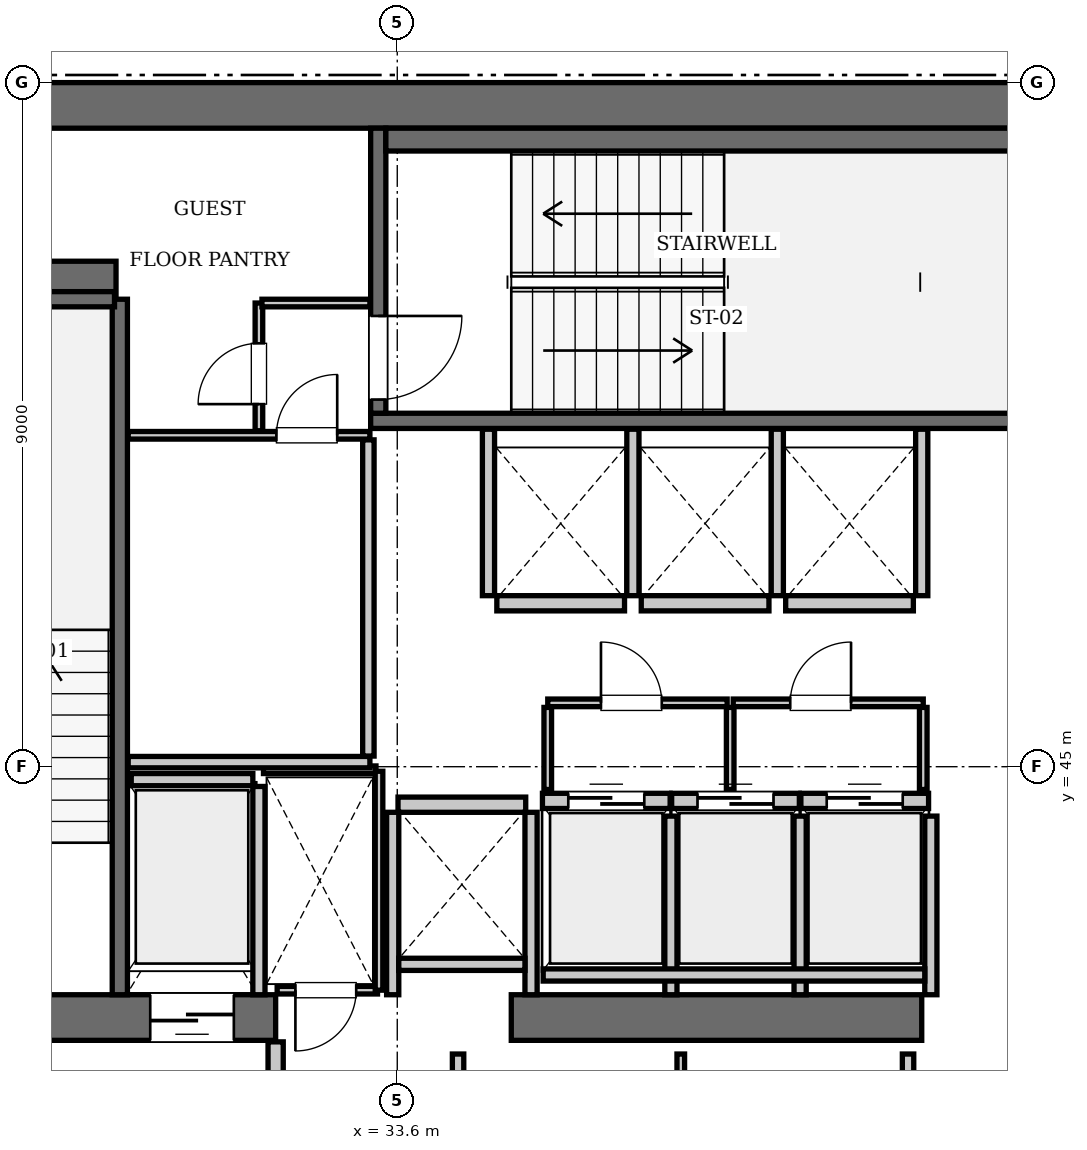
"""IFC4 building model, lengths in metres.
Left out: names, types, materials, properties, quantities, classifications, styles, units other than length and angle.
Written with IfcOpenShell. Run it as: python <this file> out.ifc"""

import sys

from ifc_helpers import new_model, si_unit, direction, frame, frame_2d, origin, place, context, subcontext, project, spatial, rectangle, extrude, element, fill, save


model = new_model("IFC4")
c1 = context("Model", 3, precision=1e-05, world=origin(), true_north=direction((0.0, 1.0)))
c2 = subcontext(c1, "Body", "Model", "MODEL_VIEW")
j1 = project(units=[si_unit("LENGTHUNIT", "METRE"), si_unit("PLANEANGLEUNIT", "RADIAN")], contexts=[c1])
p1 = place(None, origin())
s1 = spatial("IfcSite", under=j1, at=p1, CompositionType="ELEMENT")
p2 = place(p1, origin())
s2 = spatial("IfcBuilding", under=s1, at=p2, CompositionType="ELEMENT")
p3 = place(p2, frame((0.0, 0.0, 254.8)))
s3 = spatial("IfcBuildingStorey", under=s2, at=p3, CompositionType="ELEMENT", Elevation=254.8)
p4 = place(p3, frame((25.2, 53.7, 0.0), z_axis=(0.0, 0.0, 1.0), x_axis=(1.0, 0.0, 0.0)))
e1 = element("IfcWall", 1, at=p4, inside=s3, PredefinedType="SHEAR", context=c2, shape_type="SweptSolid", body=[
    extrude(rectangle(XDim=25.2, YDim=0.6, at=frame_2d((12.6, 0.0))), origin(), (0.0, 0.0, 1.0), 3.85),
])
p5 = place(p3, frame((25.2, 41.7, 0.0), z_axis=(0.0, 0.0, 1.0), x_axis=(1.0, 0.0, 0.0)))
e2 = element("IfcWall", 2, at=p5, inside=s3, PredefinedType="SHEAR", context=c2, shape_type="SweptSolid", body=[
    extrude(rectangle(XDim=6.8, YDim=0.6, at=frame_2d((3.4, 0.0))), origin(), (0.0, 0.0, 1.0), 3.85),
])
p6 = place(p5, frame((1.65, 0.0, 0.0)))
e3 = element("IfcOpeningElement", 3, at=p6, cuts=e2, PredefinedType="OPENING", context=c2, shape_type="SweptSolid", body=[
    extrude(rectangle(XDim=1.15, YDim=2.15, at=frame_2d((0.575, 1.075))), frame((0.0, 0.31, 0.0), z_axis=(0.0, -1.0, 0.0), x_axis=(1.0, 0.0, 0.0)), (0.0, 0.0, 1.0), 0.62),
])
p7 = place(p5, frame((5.15, 0.0, 0.0)))
e4 = element("IfcOpeningElement", 4, at=p7, cuts=e2, PredefinedType="OPENING", context=c2, shape_type="SweptSolid", body=[
    extrude(rectangle(XDim=1.1, YDim=2.2, at=frame_2d((0.55, 1.1))), frame((0.0, 0.31, 0.0), z_axis=(0.0, -1.0, 0.0), x_axis=(1.0, 0.0, 0.0)), (0.0, 0.0, 1.0), 0.62),
])
p8 = place(p3, frame((35.1, 41.7, 0.0), z_axis=(0.0, 0.0, 1.0), x_axis=(1.0, 0.0, 0.0)))
e5 = element("IfcWall", 5, at=p8, inside=s3, PredefinedType="SHEAR", context=c2, shape_type="SweptSolid", body=[
    extrude(rectangle(XDim=5.4, YDim=0.6, at=frame_2d((2.7, 0.0))), origin(), (0.0, 0.0, 1.0), 3.85),
])
p9 = place(p3, frame((25.8, 51.4, 0.0), z_axis=(0.0, 0.0, 1.0), x_axis=(1.0, 0.0, 0.0)))
e6 = element("IfcWall", 6, at=p9, inside=s3, PredefinedType="SHEAR", context=c2, shape_type="SweptSolid", body=[
    extrude(rectangle(XDim=4.1, YDim=0.5, at=frame_2d((2.05, 0.0))), origin(), (0.0, 0.0, 1.0), 3.85),
])
p10 = place(p3, frame((29.95, 42.0, 0.0), z_axis=(0.0, 0.0, 1.0), x_axis=(0.0, 1.0, 0.0)))
e7 = element("IfcWall", 7, at=p10, inside=s3, PredefinedType="SOLIDWALL", context=c2, shape_type="SweptSolid", body=[
    extrude(rectangle(XDim=9.15, YDim=0.2, at=frame_2d((4.575, 0.0))), origin(), (0.0, 0.0, 1.0), 3.61),
])
p11 = place(p3, frame((26.38, 51.15, 0.0), z_axis=(0.0, 0.0, 1.0), x_axis=(1.0, 0.0, 0.0)))
e8 = element("IfcWall", 8, at=p11, inside=s3, PredefinedType="SOLIDWALL", context=c2, shape_type="SweptSolid", body=[
    extrude(rectangle(XDim=3.5, YDim=0.2, at=frame_2d((1.75, 0.0))), origin(), (0.0, 0.0, 1.0), 3.61),
])
p12 = place(p3, frame((33.25, 49.55, 0.0), z_axis=(0.0, 0.0, 1.0), x_axis=(1.0, 0.0, 0.0)))
e9 = element("IfcWall", 9, at=p12, inside=s3, PredefinedType="SOLIDWALL", context=c2, shape_type="SweptSolid", body=[
    extrude(rectangle(XDim=9.1, YDim=0.2, at=frame_2d((4.55, 0.0))), origin(), (0.0, 0.0, 1.0), 3.61),
])
p13 = place(p3, frame((33.35, 49.65, 0.0), z_axis=(0.0, 0.0, 1.0), x_axis=(0.0, 1.0, 0.0)))
e10 = element("IfcWall", 10, at=p13, inside=s3, PredefinedType="SOLIDWALL", context=c2, shape_type="SweptSolid", body=[
    extrude(rectangle(XDim=3.75, YDim=0.2, at=frame_2d((1.875, 0.0))), origin(), (0.0, 0.0, 1.0), 3.61),
])
p14 = place(p13, frame((0.18, 0.0, 0.0)))
e11 = element("IfcOpeningElement", 11, at=p14, cuts=e10, PredefinedType="OPENING", context=c2, shape_type="SweptSolid", body=[
    extrude(rectangle(XDim=1.1, YDim=2.15, at=frame_2d((0.55, 1.075))), frame((0.0, 0.11, 0.0), z_axis=(0.0, -1.0, 0.0), x_axis=(1.0, 0.0, 0.0)), (0.0, 0.0, 1.0), 0.22),
])
p15 = place(p3, frame((33.45, 53.25, 0.0), z_axis=(0.0, 0.0, 1.0), x_axis=(1.0, 0.0, 0.0)))
e12 = element("IfcWall", 12, at=p15, inside=s3, PredefinedType="SOLIDWALL", context=c2, shape_type="SweptSolid", body=[
    extrude(rectangle(XDim=8.7, YDim=0.3, at=frame_2d((4.35, 0.0))), origin(), (0.0, 0.0, 1.0), 3.61),
])
p16 = place(p3, frame((35.51, 44.55, 0.0), z_axis=(0.0, 0.0, 1.0), x_axis=(1.0, 0.0, 0.0)))
e13 = element("IfcWall", 13, at=p16, inside=s3, PredefinedType="SOLIDWALL", context=c2, shape_type="SweptSolid", body=[
    extrude(rectangle(XDim=1.68, YDim=0.2, at=frame_2d((0.84, 0.0))), origin(), (0.0, 0.0, 1.0), 3.61),
])
p17 = place(p16, frame((0.34, 0.0, 0.0)))
e14 = element("IfcOpeningElement", 14, at=p17, cuts=e13, PredefinedType="OPENING", context=c2, shape_type="SweptSolid", body=[
    extrude(rectangle(XDim=1.0, YDim=2.15, at=frame_2d((0.5, 1.075))), frame((0.0, 0.11, 0.0), z_axis=(0.0, -1.0, 0.0), x_axis=(1.0, 0.0, 0.0)), (0.0, 0.0, 1.0), 0.22),
])
p18 = place(p3, frame((37.21, 44.55, 0.0), z_axis=(0.0, 0.0, 1.0), x_axis=(1.0, 0.0, 0.0)))
e15 = element("IfcWall", 15, at=p18, inside=s3, PredefinedType="SOLIDWALL", context=c2, shape_type="SweptSolid", body=[
    extrude(rectangle(XDim=1.68, YDim=0.2, at=frame_2d((0.84, 0.0))), origin(), (0.0, 0.0, 1.0), 3.61),
])
p19 = place(p18, frame((0.34, 0.0, 0.0)))
e16 = element("IfcOpeningElement", 16, at=p19, cuts=e15, PredefinedType="OPENING", context=c2, shape_type="SweptSolid", body=[
    extrude(rectangle(XDim=1.0, YDim=2.15, at=frame_2d((0.5, 1.075))), frame((0.0, 0.11, 0.0), z_axis=(0.0, -1.0, 0.0), x_axis=(1.0, 0.0, 0.0)), (0.0, 0.0, 1.0), 0.22),
])
p20 = place(p3, frame((38.91, 44.55, 0.0), z_axis=(0.0, 0.0, 1.0), x_axis=(1.0, 0.0, 0.0)))
e17 = element("IfcWall", 17, at=p20, inside=s3, PredefinedType="SOLIDWALL", context=c2, shape_type="SweptSolid", body=[
    extrude(rectangle(XDim=1.68, YDim=0.2, at=frame_2d((0.84, 0.0))), origin(), (0.0, 0.0, 1.0), 3.61),
])
p21 = place(p20, frame((0.34, 0.0, 0.0)))
e18 = element("IfcOpeningElement", 18, at=p21, cuts=e17, PredefinedType="OPENING", context=c2, shape_type="SweptSolid", body=[
    extrude(rectangle(XDim=1.0, YDim=2.15, at=frame_2d((0.5, 1.075))), frame((0.0, 0.11, 0.0), z_axis=(0.0, -1.0, 0.0), x_axis=(1.0, 0.0, 0.0)), (0.0, 0.0, 1.0), 0.22),
])
p22 = place(p3, frame((34.91, 47.15, 0.0), z_axis=(0.0, 0.0, 1.0), x_axis=(1.0, 0.0, 0.0)))
e19 = element("IfcWall", 19, at=p22, inside=s3, PredefinedType="SOLIDWALL", context=c2, shape_type="SweptSolid", body=[
    extrude(rectangle(XDim=1.68, YDim=0.2, at=frame_2d((0.84, 0.0))), origin(), (0.0, 0.0, 1.0), 3.61),
])
for number, where, z_axis, x_axis in (
    (20, (36.81, 47.15, 0.0), (0.0, 0.0, 1.0), (1.0, 0.0, 0.0)),
    (21, (38.71, 47.15, 0.0), (0.0, 0.0, 1.0), (1.0, 0.0, 0.0)),
    (22, (33.61, 44.5, 0.0), (0.0, 0.0, 1.0), (1.0, 0.0, 0.0)),
):
    element("IfcWall", number, at=place(p3, frame(where, z_axis=z_axis, x_axis=x_axis)), inside=s3, PredefinedType="SOLIDWALL", context=c2, shape_type="SweptSolid", body=[
        extrude(rectangle(XDim=1.68, YDim=0.2, at=frame_2d((0.84, 0.0))), origin(), (0.0, 0.0, 1.0), 3.61),
    ])
p23 = place(p3, frame((30.1, 44.83, 0.0), z_axis=(0.0, 0.0, 1.0), x_axis=(1.0, 0.0, 0.0)))
e23 = element("IfcWall", 23, at=p23, inside=s3, PredefinedType="SOLIDWALL", context=c2, shape_type="SweptSolid", body=[
    extrude(rectangle(XDim=1.6, YDim=0.16, at=frame_2d((0.8, 0.0))), origin(), (0.0, 0.0, 1.0), 3.61),
])
p24 = place(p3, frame((31.78, 42.0, 0.0), z_axis=(0.0, 0.0, 1.0), x_axis=(0.0, 1.0, 0.0)))
e24 = element("IfcWall", 24, at=p24, inside=s3, PredefinedType="SOLIDWALL", context=c2, shape_type="SweptSolid", body=[
    extrude(rectangle(XDim=2.74, YDim=0.16, at=frame_2d((1.37, 0.0))), origin(), (0.0, 0.0, 1.0), 3.61),
])
for number, where, z_axis, x_axis in (
    (25, (37.2, 42.0, 0.0), (0.0, 0.0, 1.0), (0.0, 1.0, 0.0)),
    (26, (38.9, 42.0, 0.0), (0.0, 0.0, 1.0), (0.0, 1.0, 0.0)),
    (27, (40.62, 42.0, 0.0), (0.0, 0.0, 1.0), (0.0, 1.0, 0.0)),
):
    element("IfcWall", number, at=place(p3, frame(where, z_axis=z_axis, x_axis=x_axis)), inside=s3, PredefinedType="SOLIDWALL", context=c2, shape_type="SweptSolid", body=[
        extrude(rectangle(XDim=2.35, YDim=0.16, at=frame_2d((1.175, 0.0))), origin(), (0.0, 0.0, 1.0), 3.61),
    ])
p25 = place(p3, frame((35.52, 42.26, 0.0), z_axis=(0.0, 0.0, 1.0), x_axis=(1.0, 0.0, 0.0)))
e28 = element("IfcWall", 28, at=p25, inside=s3, PredefinedType="SOLIDWALL", context=c2, shape_type="SweptSolid", body=[
    extrude(rectangle(XDim=5.02, YDim=0.16, at=frame_2d((2.51, 0.0))), origin(), (0.0, 0.0, 1.0), 3.61),
])
for number, where, z_axis, x_axis in (
    (29, (34.8, 47.25, 0.0), (0.0, 0.0, 1.0), (0.0, 1.0, 0.0)),
    (30, (36.7, 47.25, 0.0), (0.0, 0.0, 1.0), (0.0, 1.0, 0.0)),
    (31, (38.6, 47.25, 0.0), (0.0, 0.0, 1.0), (0.0, 1.0, 0.0)),
    (32, (40.5, 47.25, 0.0), (0.0, 0.0, 1.0), (0.0, 1.0, 0.0)),
):
    element("IfcWall", number, at=place(p3, frame(where, z_axis=z_axis, x_axis=x_axis)), inside=s3, PredefinedType="SOLIDWALL", context=c2, shape_type="SweptSolid", body=[
        extrude(rectangle(XDim=2.19, YDim=0.16, at=frame_2d((1.095, 0.0))), origin(), (0.0, 0.0, 1.0), 3.61),
    ])
for number, where, z_axis, x_axis in (
    (33, (33.54, 42.0, 0.0), (0.0, 0.0, 1.0), (0.0, 1.0, 0.0)),
    (34, (35.36, 42.0, 0.0), (0.0, 0.0, 1.0), (0.0, 1.0, 0.0)),
):
    element("IfcWall", number, at=place(p3, frame(where, z_axis=z_axis, x_axis=x_axis)), inside=s3, PredefinedType="SOLIDWALL", context=c2, shape_type="SweptSolid", body=[
        extrude(rectangle(XDim=2.4, YDim=0.16, at=frame_2d((1.2, 0.0))), origin(), (0.0, 0.0, 1.0), 3.61),
    ])
p26 = place(p3, frame((33.62, 42.4, 0.0), z_axis=(0.0, 0.0, 1.0), x_axis=(1.0, 0.0, 0.0)))
e35 = element("IfcWall", 35, at=p26, inside=s3, PredefinedType="SOLIDWALL", context=c2, shape_type="SweptSolid", body=[
    extrude(rectangle(XDim=1.66, YDim=0.16, at=frame_2d((0.83, 0.0))), origin(), (0.0, 0.0, 1.0), 3.61),
])
p27 = place(p3, frame((32.0, 38.31, 0.0), z_axis=(0.0, 0.0, 1.0), x_axis=(0.0, 1.0, 0.0)))
e36 = element("IfcWall", 36, at=p27, inside=s3, PredefinedType="PARTITIONING", context=c2, shape_type="SweptSolid", body=[
    extrude(rectangle(XDim=3.07, YDim=0.2, at=frame_2d((1.535, 0.0))), origin(), (0.0, 0.0, 1.0), 3.61),
])
p28 = place(p3, frame((32.02, 42.06, 0.0), z_axis=(0.0, 0.0, 1.0), x_axis=(1.0, 0.0, 0.0)))
e37 = element("IfcWall", 37, at=p28, inside=s3, PredefinedType="PARTITIONING", context=c2, shape_type="SweptSolid", body=[
    extrude(rectangle(XDim=1.32, YDim=0.1, at=frame_2d((0.66, 0.0))), origin(), (0.0, 0.0, 1.0), 3.61),
])
p29 = place(p28, frame((0.24, 0.0, 0.0)))
e38 = element("IfcOpeningElement", 38, at=p29, cuts=e37, PredefinedType="OPENING", context=c2, shape_type="SweptSolid", body=[
    extrude(rectangle(XDim=0.8, YDim=2.05, at=frame_2d((0.4, 1.025))), frame((0.0, 0.06, 0.0), z_axis=(0.0, -1.0, 0.0), x_axis=(1.0, 0.0, 0.0)), (0.0, 0.0, 1.0), 0.12),
])
p30 = place(p3, frame((31.84, 44.96, 0.0), z_axis=(0.0, 0.0, 1.0), x_axis=(1.0, 0.0, 0.0)))
e39 = element("IfcWall", 39, at=p30, inside=s3, PredefinedType="PARTITIONING", context=c2, shape_type="SweptSolid", body=[
    extrude(rectangle(XDim=1.48, YDim=0.1, at=frame_2d((0.74, 0.0))), origin(), (0.0, 0.0, 1.0), 3.61),
])
p31 = place(p3, frame((33.36, 42.06, 0.0), z_axis=(0.0, 0.0, 1.0), x_axis=(0.0, 1.0, 0.0)))
e40 = element("IfcWall", 40, at=p31, inside=s3, PredefinedType="PARTITIONING", context=c2, shape_type="SweptSolid", body=[
    extrude(rectangle(XDim=2.88, YDim=0.1, at=frame_2d((1.44, 0.0))), origin(), (0.0, 0.0, 1.0), 3.61),
])
p32 = place(p3, frame((35.58, 45.84, 0.0), z_axis=(0.0, 0.0, 1.0), x_axis=(1.0, 0.0, 0.0)))
e41 = element("IfcWall", 41, at=p32, inside=s3, PredefinedType="PARTITIONING", context=c2, shape_type="SweptSolid", body=[
    extrude(rectangle(XDim=2.36, YDim=0.1, at=frame_2d((1.18, 0.0))), origin(), (0.0, 0.0, 1.0), 3.61),
])
p33 = place(p32, frame((0.7, 0.0, 0.0)))
e42 = element("IfcOpeningElement", 42, at=p33, cuts=e41, PredefinedType="OPENING", context=c2, shape_type="SweptSolid", body=[
    extrude(rectangle(XDim=0.8, YDim=2.05, at=frame_2d((0.4, 1.025))), frame((0.0, 0.06, 0.0), z_axis=(0.0, -1.0, 0.0), x_axis=(1.0, 0.0, 0.0)), (0.0, 0.0, 1.0), 0.12),
])
p34 = place(p3, frame((38.02, 45.84, 0.0), z_axis=(0.0, 0.0, 1.0), x_axis=(1.0, 0.0, 0.0)))
e43 = element("IfcWall", 43, at=p34, inside=s3, PredefinedType="PARTITIONING", context=c2, shape_type="SweptSolid", body=[
    extrude(rectangle(XDim=2.5, YDim=0.1, at=frame_2d((1.25, 0.0))), origin(), (0.0, 0.0, 1.0), 3.61),
])
p35 = place(p34, frame((0.75, 0.0, 0.0)))
e44 = element("IfcOpeningElement", 44, at=p35, cuts=e43, PredefinedType="OPENING", context=c2, shape_type="SweptSolid", body=[
    extrude(rectangle(XDim=0.8, YDim=2.05, at=frame_2d((0.4, 1.025))), frame((0.0, 0.06, 0.0), z_axis=(0.0, -1.0, 0.0), x_axis=(1.0, 0.0, 0.0)), (0.0, 0.0, 1.0), 0.12),
])
for number, where, z_axis, x_axis in (
    (45, (35.58, 44.7, 0.0), (0.0, 0.0, 1.0), (0.0, 1.0, 0.0)),
    (46, (37.98, 44.7, 0.0), (0.0, 0.0, 1.0), (0.0, 1.0, 0.0)),
    (47, (40.52, 44.7, 0.0), (0.0, 0.0, 1.0), (0.0, 1.0, 0.0)),
):
    element("IfcWall", number, at=place(p3, frame(where, z_axis=z_axis, x_axis=x_axis)), inside=s3, PredefinedType="PARTITIONING", context=c2, shape_type="SweptSolid", body=[
        extrude(rectangle(XDim=1.08, YDim=0.1, at=frame_2d((0.54, 0.0))), origin(), (0.0, 0.0, 1.0), 3.61),
    ])
p36 = place(p3, frame((30.06, 45.06, 0.0), z_axis=(0.0, 0.0, 1.0), x_axis=(1.0, 0.0, 0.0)))
e48 = element("IfcWall", 48, at=p36, inside=s3, PredefinedType="PARTITIONING", context=c2, shape_type="SweptSolid", body=[
    extrude(rectangle(XDim=3.18, YDim=0.15, at=frame_2d((1.59, 0.0))), origin(), (0.0, 0.0, 1.0), 3.61),
])
p37 = place(p3, frame((33.22, 45.14, 0.0), z_axis=(0.0, 0.0, 1.0), x_axis=(0.0, 1.0, 0.0)))
e49 = element("IfcWall", 49, at=p37, inside=s3, PredefinedType="PARTITIONING", context=c2, shape_type="SweptSolid", body=[
    extrude(rectangle(XDim=4.16, YDim=0.15, at=frame_2d((2.08, 0.0))), origin(), (0.0, 0.0, 1.0), 3.61),
])
p38 = place(p3, frame((30.06, 49.36, 0.0), z_axis=(0.0, 0.0, 1.0), x_axis=(1.0, 0.0, 0.0)))
e50 = element("IfcWall", 50, at=p38, inside=s3, PredefinedType="PARTITIONING", context=c2, shape_type="SweptSolid", body=[
    extrude(rectangle(XDim=3.18, YDim=0.1, at=frame_2d((1.59, 0.0))), origin(), (0.0, 0.0, 1.0), 3.61),
])
p39 = place(p38, frame((1.95, 0.0, 0.0)))
e51 = element("IfcOpeningElement", 51, at=p39, cuts=e50, PredefinedType="OPENING", context=c2, shape_type="SweptSolid", body=[
    extrude(rectangle(XDim=0.8, YDim=2.05, at=frame_2d((0.4, 1.025))), frame((0.0, 0.06, 0.0), z_axis=(0.0, -1.0, 0.0), x_axis=(1.0, 0.0, 0.0)), (0.0, 0.0, 1.0), 0.12),
])
p40 = place(p3, frame((31.78, 49.42, 0.0), z_axis=(0.0, 0.0, 1.0), x_axis=(0.0, 1.0, 0.0)))
e52 = element("IfcWall", 52, at=p40, inside=s3, PredefinedType="PARTITIONING", context=c2, shape_type="SweptSolid", body=[
    extrude(rectangle(XDim=1.68, YDim=0.1, at=frame_2d((0.84, 0.0))), origin(), (0.0, 0.0, 1.0), 3.61),
])
p41 = place(p40, frame((0.35, 0.0, 0.0)))
e53 = element("IfcOpeningElement", 53, at=p41, cuts=e52, PredefinedType="OPENING", context=c2, shape_type="SweptSolid", body=[
    extrude(rectangle(XDim=0.8, YDim=2.05, at=frame_2d((0.4, 1.025))), frame((0.0, 0.06, 0.0), z_axis=(0.0, -1.0, 0.0), x_axis=(1.0, 0.0, 0.0)), (0.0, 0.0, 1.0), 0.12),
])
p42 = place(p3, frame((31.82, 51.1, 0.0), z_axis=(0.0, 0.0, 1.0), x_axis=(1.0, 0.0, 0.0)))
e54 = element("IfcWall", 54, at=p42, inside=s3, PredefinedType="PARTITIONING", context=c2, shape_type="SweptSolid", body=[
    extrude(rectangle(XDim=1.42, YDim=0.1, at=frame_2d((0.71, 0.0))), origin(), (0.0, 0.0, 1.0), 3.61),
])
p43 = place(p3, frame((34.4, 38.38, 0.0), z_axis=(0.0, 0.0, 1.0), x_axis=(0.0, 1.0, 0.0)))
e55 = element("IfcWall", 55, at=p43, inside=s3, PredefinedType="PARTITIONING", context=c2, shape_type="SweptSolid", body=[
    extrude(rectangle(XDim=2.84, YDim=0.15, at=frame_2d((1.42, 0.0))), origin(), (0.0, 0.0, 1.0), 3.61),
])
p44 = place(p3, frame((37.33, 38.38, 0.0), z_axis=(0.0, 0.0, 1.0), x_axis=(0.0, 1.0, 0.0)))
e56 = element("IfcWall", 56, at=p44, inside=s3, PredefinedType="PARTITIONING", context=c2, shape_type="SweptSolid", body=[
    extrude(rectangle(XDim=2.84, YDim=0.1, at=frame_2d((1.42, 0.0))), origin(), (0.0, 0.0, 1.0), 3.61),
])
p45 = place(p3, frame((40.32, 38.38, 0.0), z_axis=(0.0, 0.0, 1.0), x_axis=(0.0, 1.0, 0.0)))
e57 = element("IfcWall", 57, at=p45, inside=s3, PredefinedType="PARTITIONING", context=c2, shape_type="SweptSolid", body=[
    extrude(rectangle(XDim=2.84, YDim=0.15, at=frame_2d((1.42, 0.0))), origin(), (0.0, 0.0, 1.0), 3.61),
])
p46 = place(p14, frame((1.1, 0.0, 0.0), z_axis=(0.0, 0.0, 1.0), x_axis=(-1.0, 0.0, 0.0)))
e58 = element("IfcDoor", 58, at=p46, inside=s3, OperationType="SINGLE_SWING_LEFT", PredefinedType="DOOR", context=c2, shape_type="SweptSolid", body=[
    extrude(rectangle(XDim=1.1, YDim=2.15, at=frame_2d((0.55, 1.075))), frame((0.0, 0.025, 0.0), z_axis=(0.0, -1.0, 0.0), x_axis=(1.0, 0.0, 0.0)), (0.0, 0.0, 1.0), 0.05),
])
fill(e11, e58)
p47 = place(p17, origin())
e59 = element("IfcDoor", 59, at=p47, inside=s3, OperationType="SLIDING_TO_LEFT", PredefinedType="DOOR", context=c2, shape_type="SweptSolid", body=[
    extrude(rectangle(XDim=1.0, YDim=2.15, at=frame_2d((0.5, 1.075))), frame((0.0, 0.025, 0.0), z_axis=(0.0, -1.0, 0.0), x_axis=(1.0, 0.0, 0.0)), (0.0, 0.0, 1.0), 0.05),
])
fill(e14, e59)
p48 = place(p19, origin())
e60 = element("IfcDoor", 60, at=p48, inside=s3, OperationType="SLIDING_TO_LEFT", PredefinedType="DOOR", context=c2, shape_type="SweptSolid", body=[
    extrude(rectangle(XDim=1.0, YDim=2.15, at=frame_2d((0.5, 1.075))), frame((0.0, 0.025, 0.0), z_axis=(0.0, -1.0, 0.0), x_axis=(1.0, 0.0, 0.0)), (0.0, 0.0, 1.0), 0.05),
])
fill(e16, e60)
p49 = place(p21, origin())
e61 = element("IfcDoor", 61, at=p49, inside=s3, OperationType="SLIDING_TO_LEFT", PredefinedType="DOOR", context=c2, shape_type="SweptSolid", body=[
    extrude(rectangle(XDim=1.0, YDim=2.15, at=frame_2d((0.5, 1.075))), frame((0.0, 0.025, 0.0), z_axis=(0.0, -1.0, 0.0), x_axis=(1.0, 0.0, 0.0)), (0.0, 0.0, 1.0), 0.05),
])
fill(e18, e61)
p50 = place(p7, frame((1.1, 0.0, 0.0), z_axis=(0.0, 0.0, 1.0), x_axis=(-1.0, 0.0, 0.0)))
e62 = element("IfcDoor", 62, at=p50, inside=s3, OperationType="SLIDING_TO_LEFT", PredefinedType="DOOR", context=c2, shape_type="SweptSolid", body=[
    extrude(rectangle(XDim=1.1, YDim=2.2, at=frame_2d((0.55, 1.1))), frame((0.0, 0.025, 0.0), z_axis=(0.0, -1.0, 0.0), x_axis=(1.0, 0.0, 0.0)), (0.0, 0.0, 1.0), 0.05),
])
fill(e4, e62)
p51 = place(p29, frame((0.8, 0.0, 0.0), z_axis=(0.0, 0.0, 1.0), x_axis=(-1.0, 0.0, 0.0)))
e63 = element("IfcDoor", 63, at=p51, inside=s3, OperationType="SINGLE_SWING_RIGHT", PredefinedType="DOOR", context=c2, shape_type="SweptSolid", body=[
    extrude(rectangle(XDim=0.8, YDim=2.05, at=frame_2d((0.4, 1.025))), frame((0.0, 0.025, 0.0), z_axis=(0.0, -1.0, 0.0), x_axis=(1.0, 0.0, 0.0)), (0.0, 0.0, 1.0), 0.05),
])
fill(e38, e63)
p52 = place(p33, origin())
e64 = element("IfcDoor", 64, at=p52, inside=s3, OperationType="SINGLE_SWING_LEFT", PredefinedType="DOOR", context=c2, shape_type="SweptSolid", body=[
    extrude(rectangle(XDim=0.8, YDim=2.05, at=frame_2d((0.4, 1.025))), frame((0.0, 0.025, 0.0), z_axis=(0.0, -1.0, 0.0), x_axis=(1.0, 0.0, 0.0)), (0.0, 0.0, 1.0), 0.05),
])
fill(e42, e64)
p53 = place(p35, origin())
e65 = element("IfcDoor", 65, at=p53, inside=s3, OperationType="SINGLE_SWING_RIGHT", PredefinedType="DOOR", context=c2, shape_type="SweptSolid", body=[
    extrude(rectangle(XDim=0.8, YDim=2.05, at=frame_2d((0.4, 1.025))), frame((0.0, 0.025, 0.0), z_axis=(0.0, -1.0, 0.0), x_axis=(1.0, 0.0, 0.0)), (0.0, 0.0, 1.0), 0.05),
])
fill(e44, e65)
p54 = place(p39, origin())
e66 = element("IfcDoor", 66, at=p54, inside=s3, OperationType="SINGLE_SWING_RIGHT", PredefinedType="DOOR", context=c2, shape_type="SweptSolid", body=[
    extrude(rectangle(XDim=0.8, YDim=2.05, at=frame_2d((0.4, 1.025))), frame((0.0, 0.025, 0.0), z_axis=(0.0, -1.0, 0.0), x_axis=(1.0, 0.0, 0.0)), (0.0, 0.0, 1.0), 0.05),
])
fill(e51, e66)
p55 = place(p41, origin())
e67 = element("IfcDoor", 67, at=p55, inside=s3, OperationType="SINGLE_SWING_LEFT", PredefinedType="DOOR", context=c2, shape_type="SweptSolid", body=[
    extrude(rectangle(XDim=0.8, YDim=2.05, at=frame_2d((0.4, 1.025))), frame((0.0, 0.025, 0.0), z_axis=(0.0, -1.0, 0.0), x_axis=(1.0, 0.0, 0.0)), (0.0, 0.0, 1.0), 0.05),
])
fill(e53, e67)
save(model, sys.argv[1])
